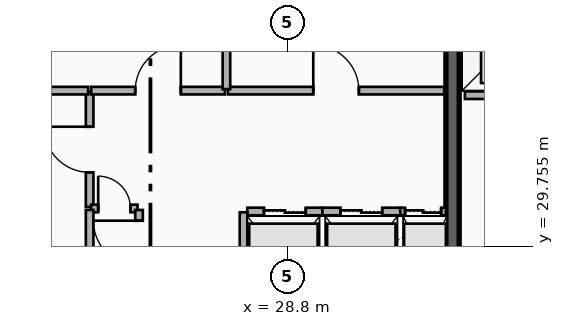
"""IFC4 building model, lengths in metres.
Left out: names, types, materials, properties, quantities, classifications, styles, units other than length and angle.
Written with IfcOpenShell. Run it as: python <this file> out.ifc"""

import sys

from ifc_helpers import new_model, si_unit, direction, frame, frame_2d, origin, place, context, subcontext, project, spatial, rectangle, extrude, element, fill, save


model = new_model("IFC4")
c1 = context("Model", 3, precision=1e-05, world=origin(), true_north=direction((0.0, 1.0)))
c2 = subcontext(c1, "Body", "Model", "MODEL_VIEW")
j1 = project(units=[si_unit("LENGTHUNIT", "METRE"), si_unit("PLANEANGLEUNIT", "RADIAN")], contexts=[c1])
p1 = place(None, origin())
s1 = spatial("IfcSite", under=j1, at=p1, CompositionType="ELEMENT")
p2 = place(p1, origin())
s2 = spatial("IfcBuilding", under=s1, at=p2, CompositionType="ELEMENT")
p3 = place(p2, frame((0.0, 0.0, 240.0)))
s3 = spatial("IfcBuildingStorey", under=s2, at=p3, CompositionType="ELEMENT", Elevation=240.0)
p4 = place(p3, frame((33.15, 28.045, 0.0), z_axis=(0.0, 0.0, 1.0), x_axis=(0.0, 1.0, 0.0)))
e1 = element("IfcWall", 1, at=p4, inside=s3, PredefinedType="SHEAR", context=c2, shape_type="SweptSolid", body=[
    extrude(rectangle(XDim=8.78, YDim=0.35, at=frame_2d((4.39, 0.0))), origin(), (0.0, 0.0, 1.0), 3.6),
])
p5 = place(p3, frame((33.475, 33.73, 0.0), z_axis=(0.0, 0.0, 1.0), x_axis=(1.0, 0.0, 0.0)))
e2 = element("IfcWall", 2, at=p5, inside=s3, PredefinedType="PARTITIONING", context=c2, shape_type="SweptSolid", body=[
    extrude(rectangle(XDim=2.725, YDim=0.2, at=frame_2d((1.362, 0.0))), origin(), (0.0, 0.0, 1.0), 2.35),
])
p6 = place(p5, frame((0.812, 0.0, 0.0)))
e3 = element("IfcOpeningElement", 3, at=p6, cuts=e2, PredefinedType="OPENING", context=c2, shape_type="SweptSolid", body=[
    extrude(rectangle(XDim=1.1, YDim=2.15, at=frame_2d((0.55, 1.075))), frame((0.0, 0.11, 0.0), z_axis=(0.0, -1.0, 0.0), x_axis=(1.0, 0.0, 0.0)), (0.0, 0.0, 1.0), 0.22),
])
p7 = place(p3, frame((27.75, 30.67, 0.0), z_axis=(0.0, 0.0, 1.0), x_axis=(1.0, 0.0, 0.0)))
e4 = element("IfcWall", 4, at=p7, inside=s3, PredefinedType="PARTITIONING", context=c2, shape_type="SweptSolid", body=[
    extrude(rectangle(XDim=1.975, YDim=0.2, at=frame_2d((0.988, 0.0))), origin(), (0.0, 0.0, 1.0), 2.35),
])
p8 = place(p7, frame((0.438, 0.0, 0.0)))
e5 = element("IfcOpeningElement", 5, at=p8, cuts=e4, PredefinedType="OPENING", context=c2, shape_type="SweptSolid", body=[
    extrude(rectangle(XDim=1.1, YDim=2.15, at=frame_2d((0.55, 1.075))), frame((0.0, 0.11, 0.0), z_axis=(0.0, -1.0, 0.0), x_axis=(1.0, 0.0, 0.0)), (0.0, 0.0, 1.0), 0.22),
])
p9 = place(p3, frame((27.65, 28.07, 0.0), z_axis=(0.0, 0.0, 1.0), x_axis=(0.0, 1.0, 0.0)))
e6 = element("IfcWall", 6, at=p9, inside=s3, PredefinedType="PARTITIONING", context=c2, shape_type="SweptSolid", body=[
    extrude(rectangle(XDim=2.58, YDim=0.2, at=frame_2d((1.29, 0.0))), origin(), (0.0, 0.0, 1.0), 2.35),
])
p10 = place(p3, frame((29.725, 30.67, 0.0), z_axis=(0.0, 0.0, 1.0), x_axis=(1.0, 0.0, 0.0)))
e7 = element("IfcWall", 7, at=p10, inside=s3, PredefinedType="PARTITIONING", context=c2, shape_type="SweptSolid", body=[
    extrude(rectangle(XDim=2.05, YDim=0.2, at=frame_2d((1.025, 0.0))), origin(), (0.0, 0.0, 1.0), 2.66),
])
p11 = place(p10, frame((0.475, 0.0, 0.0)))
e8 = element("IfcOpeningElement", 8, at=p11, cuts=e7, PredefinedType="OPENING", context=c2, shape_type="SweptSolid", body=[
    extrude(rectangle(XDim=1.1, YDim=2.15, at=frame_2d((0.55, 1.075))), frame((0.0, 0.11, 0.0), z_axis=(0.0, -1.0, 0.0), x_axis=(1.0, 0.0, 0.0)), (0.0, 0.0, 1.0), 0.22),
])
p12 = place(p3, frame((31.775, 30.67, 0.0), z_axis=(0.0, 0.0, 1.0), x_axis=(1.0, 0.0, 0.0)))
e9 = element("IfcWall", 9, at=p12, inside=s3, PredefinedType="PARTITIONING", context=c2, shape_type="SweptSolid", body=[
    extrude(rectangle(XDim=1.2, YDim=0.2, at=frame_2d((0.6, 0.0))), origin(), (0.0, 0.0, 1.0), 2.66),
])
p13 = place(p12, frame((0.125, 0.0, 0.0)))
e10 = element("IfcOpeningElement", 10, at=p13, cuts=e9, PredefinedType="OPENING", context=c2, shape_type="SweptSolid", body=[
    extrude(rectangle(XDim=0.95, YDim=2.15, at=frame_2d((0.475, 1.075))), frame((0.0, 0.11, 0.0), z_axis=(0.0, -1.0, 0.0), x_axis=(1.0, 0.0, 0.0)), (0.0, 0.0, 1.0), 0.22),
])
p14 = place(p3, frame((23.6, 30.79, 0.0), z_axis=(0.0, 0.0, 1.0), x_axis=(0.0, 1.0, 0.0)))
e11 = element("IfcWall", 11, at=p14, inside=s3, PredefinedType="PARTITIONING", context=c2, shape_type="SweptSolid", body=[
    extrude(rectangle(XDim=3.02, YDim=0.2, at=frame_2d((1.51, 0.0))), origin(), (0.0, 0.0, 1.0), 3.28),
])
p15 = place(p14, frame((0.91, 0.0, 0.0)))
e12 = element("IfcOpeningElement", 12, at=p15, cuts=e11, PredefinedType="OPENING", context=c2, shape_type="SweptSolid", body=[
    extrude(rectangle(XDim=1.2, YDim=2.15, at=frame_2d((0.6, 1.075))), frame((0.0, 0.11, 0.0), z_axis=(0.0, -1.0, 0.0), x_axis=(1.0, 0.0, 0.0)), (0.0, 0.0, 1.0), 0.22),
])
p16 = place(p3, frame((23.64, 30.75, 0.0), z_axis=(0.0, 0.0, 1.0), x_axis=(1.0, 0.0, 0.0)))
e13 = element("IfcWall", 13, at=p16, inside=s3, PredefinedType="PARTITIONING", context=c2, shape_type="SweptSolid", body=[
    extrude(rectangle(XDim=1.22, YDim=0.2, at=frame_2d((0.61, 0.0))), origin(), (0.0, 0.0, 1.0), 3.28),
])
p17 = place(p16, frame((0.185, 0.0, 0.0)))
e14 = element("IfcOpeningElement", 14, at=p17, cuts=e13, PredefinedType="OPENING", context=c2, shape_type="SweptSolid", body=[
    extrude(rectangle(XDim=0.85, YDim=2.1, at=frame_2d((0.425, 1.05))), frame((0.0, 0.11, 0.0), z_axis=(0.0, -1.0, 0.0), x_axis=(1.0, 0.0, 0.0)), (0.0, 0.0, 1.0), 0.22),
])
p18 = place(p3, frame((23.64, 33.85, 0.0), z_axis=(0.0, 0.0, 1.0), x_axis=(1.0, 0.0, 0.0)))
e15 = element("IfcWall", 15, at=p18, inside=s3, PredefinedType="PARTITIONING", context=c2, shape_type="SweptSolid", body=[
    extrude(rectangle(XDim=3.52, YDim=0.2, at=frame_2d((1.76, 0.0))), origin(), (0.0, 0.0, 1.0), 3.28),
])
p19 = place(p18, frame((1.16, 0.0, 0.0)))
e16 = element("IfcOpeningElement", 16, at=p19, cuts=e15, PredefinedType="OPENING", context=c2, shape_type="SweptSolid", body=[
    extrude(rectangle(XDim=1.2, YDim=2.15, at=frame_2d((0.6, 1.075))), frame((0.0, 0.11, 0.0), z_axis=(0.0, -1.0, 0.0), x_axis=(1.0, 0.0, 0.0)), (0.0, 0.0, 1.0), 0.22),
])
p20 = place(p3, frame((27.24, 33.85, 0.0), z_axis=(0.0, 0.0, 1.0), x_axis=(1.0, 0.0, 0.0)))
e17 = element("IfcWall", 17, at=p20, inside=s3, PredefinedType="PARTITIONING", context=c2, shape_type="SweptSolid", body=[
    extrude(rectangle(XDim=5.69, YDim=0.2, at=frame_2d((2.845, 0.0))), origin(), (0.0, 0.0, 1.0), 2.35),
])
p21 = place(p20, frame((2.245, 0.0, 0.0)))
e18 = element("IfcOpeningElement", 18, at=p21, cuts=e17, PredefinedType="OPENING", context=c2, shape_type="SweptSolid", body=[
    extrude(rectangle(XDim=1.2, YDim=2.15, at=frame_2d((0.6, 1.075))), frame((0.0, 0.11, 0.0), z_axis=(0.0, -1.0, 0.0), x_axis=(1.0, 0.0, 0.0)), (0.0, 0.0, 1.0), 0.22),
])
p22 = place(p3, frame((24.9, 28.09, 0.0), z_axis=(0.0, 0.0, 1.0), x_axis=(0.0, 1.0, 0.0)))
e19 = element("IfcWall", 19, at=p22, inside=s3, PredefinedType="PARTITIONING", context=c2, shape_type="SweptSolid", body=[
    extrude(rectangle(XDim=2.62, YDim=0.2, at=frame_2d((1.31, 0.0))), origin(), (0.0, 0.0, 1.0), 2.66),
])
p23 = place(p22, frame((1.137, 0.0, 0.0)))
e20 = element("IfcOpeningElement", 20, at=p23, cuts=e19, PredefinedType="OPENING", context=c2, shape_type="SweptSolid", body=[
    extrude(rectangle(XDim=1.2, YDim=2.15, at=frame_2d((0.6, 1.075))), frame((0.0, 0.11, 0.0), z_axis=(0.0, -1.0, 0.0), x_axis=(1.0, 0.0, 0.0)), (0.0, 0.0, 1.0), 0.22),
])
p24 = place(p3, frame((23.6, 28.09, 0.0), z_axis=(0.0, 0.0, 1.0), x_axis=(0.0, 1.0, 0.0)))
e21 = element("IfcWall", 21, at=p24, inside=s3, PredefinedType="PARTITIONING", context=c2, shape_type="SweptSolid", body=[
    extrude(rectangle(XDim=2.62, YDim=0.2, at=frame_2d((1.31, 0.0))), origin(), (0.0, 0.0, 1.0), 2.66),
])
p25 = place(p3, frame((21.59, 33.85, 0.0), z_axis=(0.0, 0.0, 1.0), x_axis=(1.0, 0.0, 0.0)))
e22 = element("IfcWall", 22, at=p25, inside=s3, PredefinedType="PARTITIONING", context=c2, shape_type="SweptSolid", body=[
    extrude(rectangle(XDim=1.97, YDim=0.2, at=frame_2d((0.985, 0.0))), origin(), (0.0, 0.0, 1.0), 2.35),
])
p26 = place(p3, frame((27.2, 33.89, 0.0), z_axis=(0.0, 0.0, 1.0), x_axis=(0.0, 1.0, 0.0)))
e23 = element("IfcWall", 23, at=p26, inside=s3, PredefinedType="PARTITIONING", context=c2, shape_type="SweptSolid", body=[
    extrude(rectangle(XDim=2.72, YDim=0.2, at=frame_2d((1.36, 0.0))), origin(), (0.0, 0.0, 1.0), 3.28),
])
p27 = place(p8, origin())
e24 = element("IfcDoor", 24, at=p27, inside=s3, OperationType="DOUBLE_DOOR_SLIDING", PredefinedType="DOOR", context=c2, shape_type="SweptSolid", body=[
    extrude(rectangle(XDim=1.1, YDim=2.15, at=frame_2d((0.55, 1.075))), frame((0.0, 0.025, 0.0), z_axis=(0.0, -1.0, 0.0), x_axis=(1.0, 0.0, 0.0)), (0.0, 0.0, 1.0), 0.05),
])
fill(e5, e24)
p28 = place(p11, origin())
e25 = element("IfcDoor", 25, at=p28, inside=s3, OperationType="DOUBLE_DOOR_SLIDING", PredefinedType="DOOR", context=c2, shape_type="SweptSolid", body=[
    extrude(rectangle(XDim=1.1, YDim=2.15, at=frame_2d((0.55, 1.075))), frame((0.0, 0.025, 0.0), z_axis=(0.0, -1.0, 0.0), x_axis=(1.0, 0.0, 0.0)), (0.0, 0.0, 1.0), 0.05),
])
fill(e8, e25)
p29 = place(p13, origin())
e26 = element("IfcDoor", 26, at=p29, inside=s3, OperationType="DOUBLE_DOOR_SLIDING", PredefinedType="DOOR", context=c2, shape_type="SweptSolid", body=[
    extrude(rectangle(XDim=0.95, YDim=2.15, at=frame_2d((0.475, 1.075))), frame((0.0, 0.025, 0.0), z_axis=(0.0, -1.0, 0.0), x_axis=(1.0, 0.0, 0.0)), (0.0, 0.0, 1.0), 0.05),
])
fill(e10, e26)
p30 = place(p15, origin())
e27 = element("IfcDoor", 27, at=p30, inside=s3, OperationType="SINGLE_SWING_RIGHT", PredefinedType="DOOR", context=c2, shape_type="SweptSolid", body=[
    extrude(rectangle(XDim=1.2, YDim=2.15, at=frame_2d((0.6, 1.075))), frame((0.0, 0.025, 0.0), z_axis=(0.0, -1.0, 0.0), x_axis=(1.0, 0.0, 0.0)), (0.0, 0.0, 1.0), 0.05),
])
fill(e12, e27)
p31 = place(p17, origin())
e28 = element("IfcDoor", 28, at=p31, inside=s3, OperationType="SINGLE_SWING_LEFT", PredefinedType="DOOR", context=c2, shape_type="SweptSolid", body=[
    extrude(rectangle(XDim=0.85, YDim=2.1, at=frame_2d((0.425, 1.05))), frame((0.0, 0.025, 0.0), z_axis=(0.0, -1.0, 0.0), x_axis=(1.0, 0.0, 0.0)), (0.0, 0.0, 1.0), 0.05),
])
fill(e14, e28)
p32 = place(p19, origin())
e29 = element("IfcDoor", 29, at=p32, inside=s3, OperationType="SINGLE_SWING_RIGHT", PredefinedType="DOOR", context=c2, shape_type="SweptSolid", body=[
    extrude(rectangle(XDim=1.2, YDim=2.15, at=frame_2d((0.6, 1.075))), frame((0.0, 0.025, 0.0), z_axis=(0.0, -1.0, 0.0), x_axis=(1.0, 0.0, 0.0)), (0.0, 0.0, 1.0), 0.05),
])
fill(e16, e29)
p33 = place(p21, origin())
e30 = element("IfcDoor", 30, at=p33, inside=s3, OperationType="SINGLE_SWING_LEFT", PredefinedType="DOOR", context=c2, shape_type="SweptSolid", body=[
    extrude(rectangle(XDim=1.2, YDim=2.15, at=frame_2d((0.6, 1.075))), frame((0.0, 0.025, 0.0), z_axis=(0.0, -1.0, 0.0), x_axis=(1.0, 0.0, 0.0)), (0.0, 0.0, 1.0), 0.05),
])
fill(e18, e30)
p34 = place(p23, origin())
e31 = element("IfcDoor", 31, at=p34, inside=s3, OperationType="SINGLE_SWING_RIGHT", PredefinedType="DOOR", context=c2, shape_type="SweptSolid", body=[
    extrude(rectangle(XDim=1.2, YDim=2.15, at=frame_2d((0.6, 1.075))), frame((0.0, 0.025, 0.0), z_axis=(0.0, -1.0, 0.0), x_axis=(1.0, 0.0, 0.0)), (0.0, 0.0, 1.0), 0.05),
])
fill(e20, e31)
save(model, sys.argv[1])
